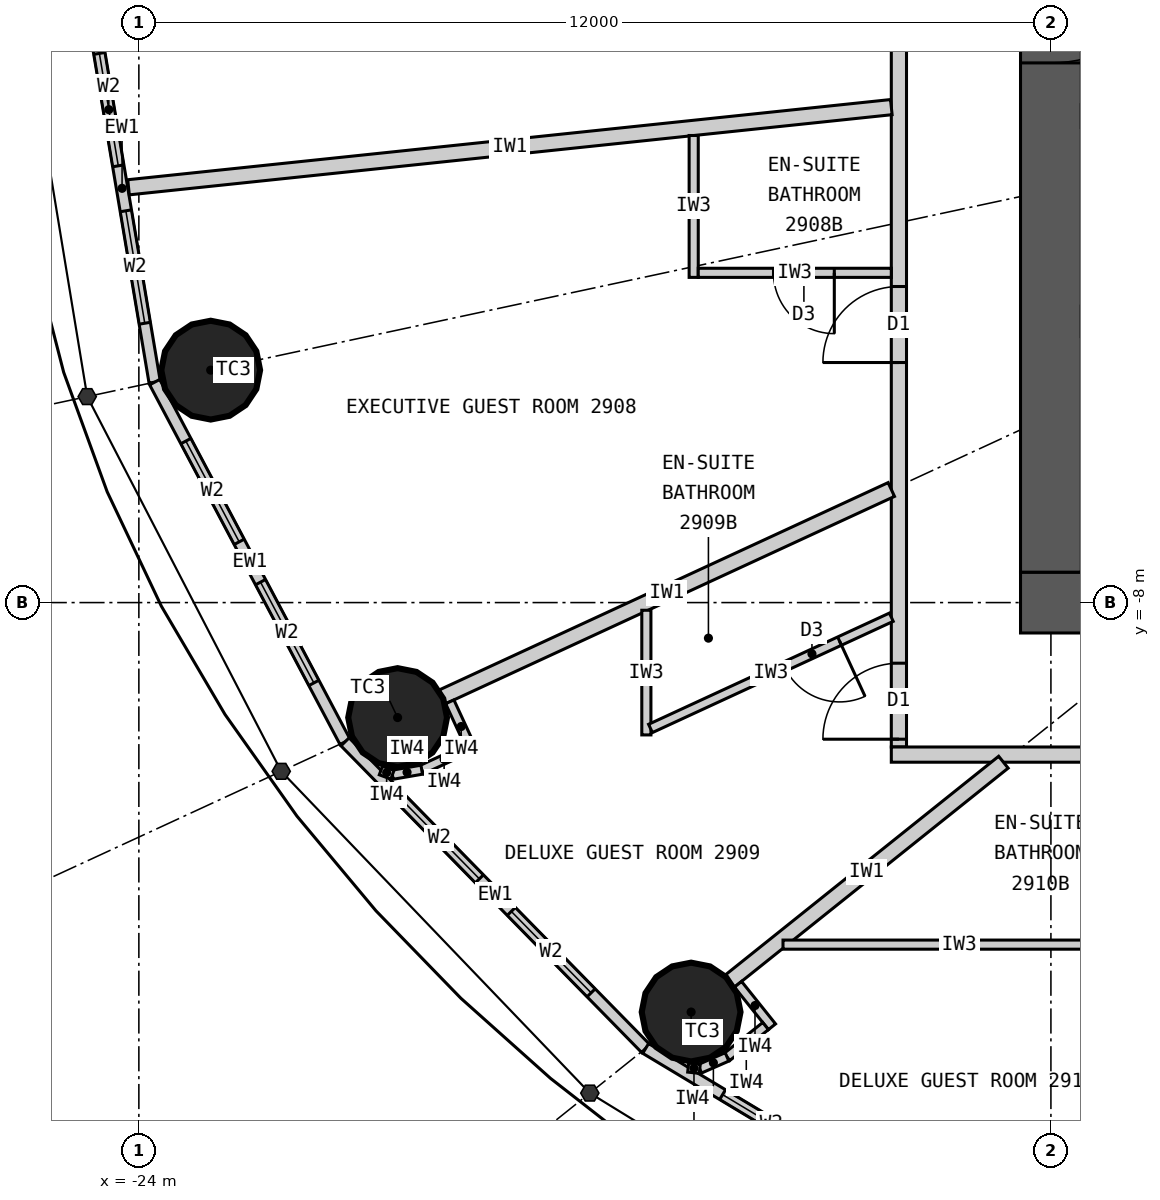
"""IFC4 building model, lengths in metres.
Left out: names, types, materials, properties, quantities, classifications, styles, units other than length and angle.
Written with IfcOpenShell. Run it as: python <this file> out.ifc"""

import sys

from ifc_helpers import new_model, si_unit, direction, frame, frame_2d, origin, origin_2d, place, context, subcontext, project, spatial, rectangle, circle, extrude, element, fill, save


model = new_model("IFC4")
c1 = context("Model", 3, precision=1e-05, world=origin(), true_north=direction((0.0, 1.0)))
c2 = subcontext(c1, "Body", "Model", "MODEL_VIEW")
j1 = project(units=[si_unit("LENGTHUNIT", "METRE"), si_unit("PLANEANGLEUNIT", "RADIAN")], contexts=[c1])
p1 = place(None, origin())
s1 = spatial("IfcSite", under=j1, at=p1, CompositionType="ELEMENT")
p2 = place(p1, origin())
s2 = spatial("IfcBuilding", under=s1, at=p2, CompositionType="ELEMENT")
p3 = place(p2, frame((0.0, 0.0, 115.5)))
s3 = spatial("IfcBuildingStorey", under=s2, at=p3, CompositionType="ELEMENT", Elevation=115.5)
for number, where, z_axis, x_axis in (
    (1, (-23.055, -4.942, 0.0), (0.0, 0.0, 1.0), (1.0, 0.0, 0.0)),
    (2, (-20.596, -9.513, 0.0), (0.0, 0.0, 1.0), (1.0, 0.0, 0.0)),
    (3, (-16.734, -13.387, 0.0), (0.0, 0.0, 1.0), (1.0, 0.0, 0.0)),
):
    element("IfcColumn", number, at=place(p3, frame(where, z_axis=z_axis, x_axis=x_axis)), inside=s3, PredefinedType="COLUMN", context=c2, shape_type="SweptSolid", body=[
        extrude(circle(Radius=0.65, at=origin_2d()), origin(), (0.0, 0.0, 1.0), 3.3),
    ])
p4 = place(p3, frame((12.4, -8.0, 0.0), z_axis=(0.0, 0.0, 1.0), x_axis=(-1.0, 0.0, 0.0)))
e4 = element("IfcWall", 4, at=p4, inside=s3, PredefinedType="SHEAR", context=c2, shape_type="SweptSolid", body=[
    extrude(rectangle(XDim=24.8, YDim=0.8, at=frame_2d((12.4, 0.0))), origin(), (0.0, 0.0, 1.0), 3.3),
])
p5 = place(p4, frame((11.1, 0.0, 0.0)))
e5 = element("IfcOpeningElement", 5, at=p5, cuts=e4, PredefinedType="OPENING", context=c2, shape_type="SweptSolid", body=[
    extrude(rectangle(XDim=1.2, YDim=2.2, at=frame_2d((0.6, 1.1))), frame((0.0, 0.41, 0.0), z_axis=(0.0, -1.0, 0.0), x_axis=(1.0, 0.0, 0.0)), (0.0, 0.0, 1.0), 0.82),
])
p6 = place(p4, frame((18.7, 0.0, 0.0)))
e6 = element("IfcOpeningElement", 6, at=p6, cuts=e4, PredefinedType="OPENING", context=c2, shape_type="SweptSolid", body=[
    extrude(rectangle(XDim=0.9, YDim=2.2, at=frame_2d((0.45, 1.1))), frame((0.0, 0.41, 0.0), z_axis=(0.0, -1.0, 0.0), x_axis=(1.0, 0.0, 0.0)), (0.0, 0.0, 1.0), 0.82),
])
p7 = place(p3, frame((-12.0, 7.6, 0.0), z_axis=(0.0, 0.0, 1.0), x_axis=(0.0, -1.0, 0.0)))
e7 = element("IfcWall", 7, at=p7, inside=s3, PredefinedType="SHEAR", context=c2, shape_type="SweptSolid", body=[
    extrude(rectangle(XDim=15.2, YDim=0.8, at=frame_2d((7.6, 0.0))), origin(), (0.0, 0.0, 1.0), 3.3),
])
p8 = place(p7, frame((6.7, 0.0, 0.0)))
e8 = element("IfcOpeningElement", 8, at=p8, cuts=e7, PredefinedType="OPENING", context=c2, shape_type="SweptSolid", body=[
    extrude(rectangle(XDim=1.8, YDim=2.2, at=frame_2d((0.9, 1.1))), frame((0.0, 0.41, 0.0), z_axis=(0.0, -1.0, 0.0), x_axis=(1.0, 0.0, 0.0)), (0.0, 0.0, 1.0), 0.82),
])
p9 = place(p3, frame((-24.65, 0.0, 0.0), z_axis=(0.0, 0.0, 1.0), x_axis=(0.165883894218, -0.986145290329, 0.0)))
e9 = element("IfcWall", 9, at=p9, inside=s3, PredefinedType="ELEMENTEDWALL", context=c2, shape_type="SweptSolid", body=[
    extrude(rectangle(XDim=5.172, YDim=0.15, at=frame_2d((2.586, 0.0))), origin(), (0.0, 0.0, 1.0), 3.12),
])
p10 = place(p9, frame((0.786, 0.0, 0.9)))
e10 = element("IfcOpeningElement", 10, at=p10, cuts=e9, PredefinedType="OPENING", context=c2, shape_type="SweptSolid", body=[
    extrude(rectangle(XDim=1.5, YDim=1.9, at=frame_2d((0.75, 0.95))), frame((0.0, 0.085, 0.0), z_axis=(0.0, -1.0, 0.0), x_axis=(1.0, 0.0, 0.0)), (0.0, 0.0, 1.0), 0.17),
])
p11 = place(p9, frame((2.886, 0.0, 0.9)))
e11 = element("IfcOpeningElement", 11, at=p11, cuts=e9, PredefinedType="OPENING", context=c2, shape_type="SweptSolid", body=[
    extrude(rectangle(XDim=1.5, YDim=1.9, at=frame_2d((0.75, 0.95))), frame((0.0, 0.085, 0.0), z_axis=(0.0, -1.0, 0.0), x_axis=(1.0, 0.0, 0.0)), (0.0, 0.0, 1.0), 0.17),
])
p12 = place(p3, frame((-23.792, -5.1, 0.0), z_axis=(0.0, 0.0, 1.0), x_axis=(0.467814388454, -0.883826735257, 0.0)))
e12 = element("IfcWall", 12, at=p12, inside=s3, PredefinedType="ELEMENTEDWALL", context=c2, shape_type="SweptSolid", body=[
    extrude(rectangle(XDim=5.354, YDim=0.15, at=frame_2d((2.677, 0.0))), origin(), (0.0, 0.0, 1.0), 3.12),
])
p13 = place(p12, frame((0.877, 0.0, 0.9)))
e13 = element("IfcOpeningElement", 13, at=p13, cuts=e12, PredefinedType="OPENING", context=c2, shape_type="SweptSolid", body=[
    extrude(rectangle(XDim=1.5, YDim=1.9, at=frame_2d((0.75, 0.95))), frame((0.0, 0.085, 0.0), z_axis=(0.0, -1.0, 0.0), x_axis=(1.0, 0.0, 0.0)), (0.0, 0.0, 1.0), 0.17),
])
p14 = place(p12, frame((2.977, 0.0, 0.9)))
e14 = element("IfcOpeningElement", 14, at=p14, cuts=e12, PredefinedType="OPENING", context=c2, shape_type="SweptSolid", body=[
    extrude(rectangle(XDim=1.5, YDim=1.9, at=frame_2d((0.75, 0.95))), frame((0.0, 0.085, 0.0), z_axis=(0.0, -1.0, 0.0), x_axis=(1.0, 0.0, 0.0)), (0.0, 0.0, 1.0), 0.17),
])
p15 = place(p3, frame((-21.287, -9.832, 0.0), z_axis=(0.0, 0.0, 1.0), x_axis=(0.700136650834, -0.714008872605, 0.0)))
e15 = element("IfcWall", 15, at=p15, inside=s3, PredefinedType="ELEMENTEDWALL", context=c2, shape_type="SweptSolid", body=[
    extrude(rectangle(XDim=5.649, YDim=0.15, at=frame_2d((2.825, 0.0))), origin(), (0.0, 0.0, 1.0), 3.12),
])
p16 = place(p15, frame((1.025, 0.0, 0.9)))
e16 = element("IfcOpeningElement", 16, at=p16, cuts=e15, PredefinedType="OPENING", context=c2, shape_type="SweptSolid", body=[
    extrude(rectangle(XDim=1.5, YDim=1.9, at=frame_2d((0.75, 0.95))), frame((0.0, 0.085, 0.0), z_axis=(0.0, -1.0, 0.0), x_axis=(1.0, 0.0, 0.0)), (0.0, 0.0, 1.0), 0.17),
])
p17 = place(p15, frame((3.125, 0.0, 0.9)))
e17 = element("IfcOpeningElement", 17, at=p17, cuts=e15, PredefinedType="OPENING", context=c2, shape_type="SweptSolid", body=[
    extrude(rectangle(XDim=1.5, YDim=1.9, at=frame_2d((0.75, 0.95))), frame((0.0, 0.085, 0.0), z_axis=(0.0, -1.0, 0.0), x_axis=(1.0, 0.0, 0.0)), (0.0, 0.0, 1.0), 0.17),
])
p18 = place(p3, frame((-17.332, -13.866, 0.0), z_axis=(0.0, 0.0, 1.0), x_axis=(0.857308573723, -0.514802884044, 0.0)))
e18 = element("IfcWall", 18, at=p18, inside=s3, PredefinedType="ELEMENTEDWALL", context=c2, shape_type="SweptSolid", body=[
    extrude(rectangle(XDim=5.961, YDim=0.15, at=frame_2d((2.98, 0.0))), origin(), (0.0, 0.0, 1.0), 3.12),
])
p19 = place(p18, frame((1.181, 0.0, 0.9)))
e19 = element("IfcOpeningElement", 19, at=p19, cuts=e18, PredefinedType="OPENING", context=c2, shape_type="SweptSolid", body=[
    extrude(rectangle(XDim=1.5, YDim=1.9, at=frame_2d((0.75, 0.95))), frame((0.0, 0.085, 0.0), z_axis=(0.0, -1.0, 0.0), x_axis=(1.0, 0.0, 0.0)), (0.0, 0.0, 1.0), 0.17),
])
p20 = place(p18, frame((3.281, 0.0, 0.9)))
e20 = element("IfcOpeningElement", 20, at=p20, cuts=e18, PredefinedType="OPENING", context=c2, shape_type="SweptSolid", body=[
    extrude(rectangle(XDim=1.5, YDim=1.9, at=frame_2d((0.75, 0.95))), frame((0.0, 0.085, 0.0), z_axis=(0.0, -1.0, 0.0), x_axis=(1.0, 0.0, 0.0)), (0.0, 0.0, 1.0), 0.17),
])
p21 = place(p3, frame((-14.0, 9.9, 0.0), z_axis=(0.0, 0.0, 1.0), x_axis=(0.0, -1.0, 0.0)))
e21 = element("IfcWall", 21, at=p21, inside=s3, PredefinedType="PARTITIONING", context=c2, shape_type="SweptSolid", body=[
    extrude(rectangle(XDim=19.8, YDim=0.2, at=frame_2d((9.9, 0.0))), origin(), (0.0, 0.0, 1.0), 3.12),
])
p22 = place(p21, frame((3.622, 0.0, 0.0)))
e22 = element("IfcOpeningElement", 22, at=p22, cuts=e21, PredefinedType="OPENING", context=c2, shape_type="SweptSolid", body=[
    extrude(rectangle(XDim=1.0, YDim=2.2, at=frame_2d((0.5, 1.1))), frame((0.0, 0.11, 0.0), z_axis=(0.0, -1.0, 0.0), x_axis=(1.0, 0.0, 0.0)), (0.0, 0.0, 1.0), 0.22),
])
p23 = place(p21, frame((9.238, 0.0, 0.0)))
e23 = element("IfcOpeningElement", 23, at=p23, cuts=e21, PredefinedType="OPENING", context=c2, shape_type="SweptSolid", body=[
    extrude(rectangle(XDim=1.0, YDim=2.2, at=frame_2d((0.5, 1.1))), frame((0.0, 0.11, 0.0), z_axis=(0.0, -1.0, 0.0), x_axis=(1.0, 0.0, 0.0)), (0.0, 0.0, 1.0), 0.22),
])
p24 = place(p21, frame((13.742, 0.0, 0.0)))
e24 = element("IfcOpeningElement", 24, at=p24, cuts=e21, PredefinedType="OPENING", context=c2, shape_type="SweptSolid", body=[
    extrude(rectangle(XDim=1.0, YDim=2.2, at=frame_2d((0.5, 1.1))), frame((0.0, 0.11, 0.0), z_axis=(0.0, -1.0, 0.0), x_axis=(1.0, 0.0, 0.0)), (0.0, 0.0, 1.0), 0.22),
])
p25 = place(p21, frame((18.698, 0.0, 0.0)))
e25 = element("IfcOpeningElement", 25, at=p25, cuts=e21, PredefinedType="OPENING", context=c2, shape_type="SweptSolid", body=[
    extrude(rectangle(XDim=1.0, YDim=2.2, at=frame_2d((0.5, 1.1))), frame((0.0, 0.11, 0.0), z_axis=(0.0, -1.0, 0.0), x_axis=(1.0, 0.0, 0.0)), (0.0, 0.0, 1.0), 0.22),
])
p26 = place(p3, frame((-3.283, -10.0, 0.0), z_axis=(0.0, 0.0, 1.0), x_axis=(-1.0, 0.0, 0.0)))
e26 = element("IfcWall", 26, at=p26, inside=s3, PredefinedType="PARTITIONING", context=c2, shape_type="SweptSolid", body=[
    extrude(rectangle(XDim=10.817, YDim=0.2, at=frame_2d((5.409, 0.0))), origin(), (0.0, 0.0, 1.0), 3.12),
])
p27 = place(p26, frame((6.482, 0.0, 0.0)))
e27 = element("IfcOpeningElement", 27, at=p27, cuts=e26, PredefinedType="OPENING", context=c2, shape_type="SweptSolid", body=[
    extrude(rectangle(XDim=1.0, YDim=2.2, at=frame_2d((0.5, 1.1))), frame((0.0, 0.11, 0.0), z_axis=(0.0, -1.0, 0.0), x_axis=(1.0, 0.0, 0.0)), (0.0, 0.0, 1.0), 0.22),
])
p28 = place(p3, frame((-14.1, -1.482, 0.0), z_axis=(0.0, 0.0, 1.0), x_axis=(-0.994523202615, -0.104516024894, 0.0)))
e28 = element("IfcWall", 28, at=p28, inside=s3, PredefinedType="PARTITIONING", context=c2, shape_type="SweptSolid", body=[
    extrude(rectangle(XDim=10.091, YDim=0.2, at=frame_2d((5.045, 0.0))), origin(), (0.0, 0.0, 1.0), 2.47),
])
p29 = place(p3, frame((-14.1, -6.512, 0.0), z_axis=(0.0, 0.0, 1.0), x_axis=(-0.907833019998, -0.419331858797, 0.0)))
e29 = element("IfcWall", 29, at=p29, inside=s3, PredefinedType="PARTITIONING", context=c2, shape_type="SweptSolid", body=[
    extrude(rectangle(XDim=6.505, YDim=0.2, at=frame_2d((3.252, 0.0))), origin(), (0.0, 0.0, 1.0), 2.27),
])
p30 = place(p3, frame((-12.625, -10.1, 0.0), z_axis=(0.0, 0.0, 1.0), x_axis=(-0.780863644897, -0.624701503182, 0.0)))
e30 = element("IfcWall", 30, at=p30, inside=s3, PredefinedType="PARTITIONING", context=c2, shape_type="SweptSolid", body=[
    extrude(rectangle(XDim=4.612, YDim=0.2, at=frame_2d((2.306, 0.0))), origin(), (0.0, 0.0, 1.0), 2.37),
])
p31 = place(p3, frame((-16.7, -1.855, 0.0), z_axis=(0.0, 0.0, 1.0), x_axis=(0.0, -1.0, 0.0)))
e31 = element("IfcWall", 31, at=p31, inside=s3, PredefinedType="PARTITIONING", context=c2, shape_type="SweptSolid", body=[
    extrude(rectangle(XDim=1.867, YDim=0.12, at=frame_2d((0.933, 0.0))), origin(), (0.0, 0.0, 1.0), 3.12),
])
p32 = place(p3, frame((-14.1, -3.662, 0.0), z_axis=(0.0, 0.0, 1.0), x_axis=(-1.0, 0.0, 0.0)))
e32 = element("IfcWall", 32, at=p32, inside=s3, PredefinedType="PARTITIONING", context=c2, shape_type="SweptSolid", body=[
    extrude(rectangle(XDim=2.54, YDim=0.12, at=frame_2d((1.27, 0.0))), origin(), (0.0, 0.0, 1.0), 2.37),
])
p33 = place(p32, frame((0.75, 0.0, 0.0)))
e33 = element("IfcOpeningElement", 33, at=p33, cuts=e32, PredefinedType="OPENING", context=c2, shape_type="SweptSolid", body=[
    extrude(rectangle(XDim=0.8, YDim=2.1, at=frame_2d((0.4, 1.05))), frame((0.0, 0.07, 0.0), z_axis=(0.0, -1.0, 0.0), x_axis=(1.0, 0.0, 0.0)), (0.0, 0.0, 1.0), 0.14),
])
p34 = place(p3, frame((-17.323, -8.101, 0.0), z_axis=(0.0, 0.0, 1.0), x_axis=(0.0, -1.0, 0.0)))
e34 = element("IfcWall", 34, at=p34, inside=s3, PredefinedType="PARTITIONING", context=c2, shape_type="SweptSolid", body=[
    extrude(rectangle(XDim=1.64, YDim=0.12, at=frame_2d((0.82, 0.0))), origin(), (0.0, 0.0, 1.0), 3.12),
])
p35 = place(p3, frame((-14.1, -8.193, 0.0), z_axis=(0.0, 0.0, 1.0), x_axis=(-0.907836493557, -0.419324338628, 0.0)))
e35 = element("IfcWall", 35, at=p35, inside=s3, PredefinedType="PARTITIONING", context=c2, shape_type="SweptSolid", body=[
    extrude(rectangle(XDim=3.49, YDim=0.12, at=frame_2d((1.745, 0.0))), origin(), (0.0, 0.0, 1.0), 3.12),
])
p36 = place(p35, frame((0.75, 0.0, 0.0)))
e36 = element("IfcOpeningElement", 36, at=p36, cuts=e35, PredefinedType="OPENING", context=c2, shape_type="SweptSolid", body=[
    extrude(rectangle(XDim=0.8, YDim=2.1, at=frame_2d((0.4, 1.05))), frame((0.0, 0.07, 0.0), z_axis=(0.0, -1.0, 0.0), x_axis=(1.0, 0.0, 0.0)), (0.0, 0.0, 1.0), 0.14),
])
p37 = place(p3, frame((-15.525, -12.5, 0.0), z_axis=(0.0, 0.0, 1.0), x_axis=(1.0, 0.0, 0.0)))
e37 = element("IfcWall", 37, at=p37, inside=s3, PredefinedType="PARTITIONING", context=c2, shape_type="SweptSolid", body=[
    extrude(rectangle(XDim=4.64, YDim=0.12, at=frame_2d((2.32, 0.0))), origin(), (0.0, 0.0, 1.0), 3.12),
])
p38 = place(p3, frame((-19.909, -9.306, 0.0), z_axis=(0.0, 0.0, 1.0), x_axis=(0.419296148934, -0.90784951368, 0.0)))
e38 = element("IfcWall", 38, at=p38, inside=s3, PredefinedType="PARTITIONING", context=c2, shape_type="SweptSolid", body=[
    extrude(rectangle(XDim=0.716, YDim=0.12, at=frame_2d((0.358, 0.0))), origin(), (0.0, 0.0, 1.0), 3.12),
])
p39 = place(p3, frame((-19.689, -9.926, 0.0), z_axis=(0.0, 0.0, 1.0), x_axis=(-0.907893409272, -0.419201094227, 0.0)))
e39 = element("IfcWall", 39, at=p39, inside=s3, PredefinedType="PARTITIONING", context=c2, shape_type="SweptSolid", body=[
    extrude(rectangle(XDim=0.65, YDim=0.12, at=frame_2d((0.325, 0.0))), origin(), (0.0, 0.0, 1.0), 3.12),
])
p40 = place(p3, frame((-20.279, -10.199, 0.0), z_axis=(0.0, 0.0, 1.0), x_axis=(-0.985380740712, -0.170366651181, 0.0)))
e40 = element("IfcWall", 40, at=p40, inside=s3, PredefinedType="PARTITIONING", context=c2, shape_type="SweptSolid", body=[
    extrude(rectangle(XDim=0.391, YDim=0.12, at=frame_2d((0.196, 0.0))), origin(), (0.0, 0.0, 1.0), 3.12),
])
p41 = place(p3, frame((-20.664, -10.265, 0.0), z_axis=(0.0, 0.0, 1.0), x_axis=(-0.938058651481, 0.346476501918, 0.0)))
e41 = element("IfcWall", 41, at=p41, inside=s3, PredefinedType="PARTITIONING", context=c2, shape_type="SweptSolid", body=[
    extrude(rectangle(XDim=0.161, YDim=0.12, at=frame_2d((0.081, 0.0))), origin(), (0.0, 0.0, 1.0), 3.12),
])
p42 = place(p3, frame((-16.117, -13.022, 0.0), z_axis=(0.0, 0.0, 1.0), x_axis=(0.62465344249, -0.780902091677, 0.0)))
e42 = element("IfcWall", 42, at=p42, inside=s3, PredefinedType="PARTITIONING", context=c2, shape_type="SweptSolid", body=[
    extrude(rectangle(XDim=0.716, YDim=0.12, at=frame_2d((0.358, 0.0))), origin(), (0.0, 0.0, 1.0), 3.12),
])
p43 = place(p3, frame((-15.754, -13.571, 0.0), z_axis=(0.0, 0.0, 1.0), x_axis=(-0.780905453553, -0.624649239663, 0.0)))
e43 = element("IfcWall", 43, at=p43, inside=s3, PredefinedType="PARTITIONING", context=c2, shape_type="SweptSolid", body=[
    extrude(rectangle(XDim=0.65, YDim=0.12, at=frame_2d((0.325, 0.0))), origin(), (0.0, 0.0, 1.0), 3.12),
])
p44 = place(p3, frame((-16.262, -13.977, 0.0), z_axis=(0.0, 0.0, 1.0), x_axis=(-0.915985403703, -0.401211590314, 0.0)))
e44 = element("IfcWall", 44, at=p44, inside=s3, PredefinedType="PARTITIONING", context=c2, shape_type="SweptSolid", body=[
    extrude(rectangle(XDim=0.391, YDim=0.12, at=frame_2d((0.196, 0.0))), origin(), (0.0, 0.0, 1.0), 3.12),
])
p45 = place(p3, frame((-16.62, -14.134, 0.0), z_axis=(0.0, 0.0, 1.0), x_axis=(-0.993941871493, 0.109907033867, 0.0)))
e45 = element("IfcWall", 45, at=p45, inside=s3, PredefinedType="PARTITIONING", context=c2, shape_type="SweptSolid", body=[
    extrude(rectangle(XDim=0.153, YDim=0.12, at=frame_2d((0.077, 0.0))), origin(), (0.0, 0.0, 1.0), 3.12),
])
p46 = place(p10, origin())
e46 = element("IfcWindow", 46, at=p46, inside=s3, PartitioningType="SINGLE_PANEL", PredefinedType="WINDOW", context=c2, shape_type="SweptSolid", body=[
    extrude(rectangle(XDim=1.5, YDim=1.9, at=frame_2d((0.75, 0.95))), frame((0.0, 0.03, 0.0), z_axis=(0.0, -1.0, 0.0), x_axis=(1.0, 0.0, 0.0)), (0.0, 0.0, 1.0), 0.06),
])
fill(e10, e46)
p47 = place(p11, origin())
e47 = element("IfcWindow", 47, at=p47, inside=s3, PartitioningType="SINGLE_PANEL", PredefinedType="WINDOW", context=c2, shape_type="SweptSolid", body=[
    extrude(rectangle(XDim=1.5, YDim=1.9, at=frame_2d((0.75, 0.95))), frame((0.0, 0.03, 0.0), z_axis=(0.0, -1.0, 0.0), x_axis=(1.0, 0.0, 0.0)), (0.0, 0.0, 1.0), 0.06),
])
fill(e11, e47)
p48 = place(p13, origin())
e48 = element("IfcWindow", 48, at=p48, inside=s3, PartitioningType="SINGLE_PANEL", PredefinedType="WINDOW", context=c2, shape_type="SweptSolid", body=[
    extrude(rectangle(XDim=1.5, YDim=1.9, at=frame_2d((0.75, 0.95))), frame((0.0, 0.03, 0.0), z_axis=(0.0, -1.0, 0.0), x_axis=(1.0, 0.0, 0.0)), (0.0, 0.0, 1.0), 0.06),
])
fill(e13, e48)
p49 = place(p14, origin())
e49 = element("IfcWindow", 49, at=p49, inside=s3, PartitioningType="SINGLE_PANEL", PredefinedType="WINDOW", context=c2, shape_type="SweptSolid", body=[
    extrude(rectangle(XDim=1.5, YDim=1.9, at=frame_2d((0.75, 0.95))), frame((0.0, 0.03, 0.0), z_axis=(0.0, -1.0, 0.0), x_axis=(1.0, 0.0, 0.0)), (0.0, 0.0, 1.0), 0.06),
])
fill(e14, e49)
p50 = place(p16, origin())
e50 = element("IfcWindow", 50, at=p50, inside=s3, PartitioningType="SINGLE_PANEL", PredefinedType="WINDOW", context=c2, shape_type="SweptSolid", body=[
    extrude(rectangle(XDim=1.5, YDim=1.9, at=frame_2d((0.75, 0.95))), frame((0.0, 0.03, 0.0), z_axis=(0.0, -1.0, 0.0), x_axis=(1.0, 0.0, 0.0)), (0.0, 0.0, 1.0), 0.06),
])
fill(e16, e50)
p51 = place(p17, origin())
e51 = element("IfcWindow", 51, at=p51, inside=s3, PartitioningType="SINGLE_PANEL", PredefinedType="WINDOW", context=c2, shape_type="SweptSolid", body=[
    extrude(rectangle(XDim=1.5, YDim=1.9, at=frame_2d((0.75, 0.95))), frame((0.0, 0.03, 0.0), z_axis=(0.0, -1.0, 0.0), x_axis=(1.0, 0.0, 0.0)), (0.0, 0.0, 1.0), 0.06),
])
fill(e17, e51)
p52 = place(p19, origin())
e52 = element("IfcWindow", 52, at=p52, inside=s3, PartitioningType="SINGLE_PANEL", PredefinedType="WINDOW", context=c2, shape_type="SweptSolid", body=[
    extrude(rectangle(XDim=1.5, YDim=1.9, at=frame_2d((0.75, 0.95))), frame((0.0, 0.03, 0.0), z_axis=(0.0, -1.0, 0.0), x_axis=(1.0, 0.0, 0.0)), (0.0, 0.0, 1.0), 0.06),
])
fill(e19, e52)
p53 = place(p33, origin())
e53 = element("IfcDoor", 53, at=p53, inside=s3, OperationType="SINGLE_SWING_LEFT", PredefinedType="DOOR", context=c2, shape_type="SweptSolid", body=[
    extrude(rectangle(XDim=0.8, YDim=2.1, at=frame_2d((0.4, 1.05))), frame((0.0, 0.025, 0.0), z_axis=(0.0, -1.0, 0.0), x_axis=(1.0, 0.0, 0.0)), (0.0, 0.0, 1.0), 0.05),
])
fill(e33, e53)
p54 = place(p24, origin())
e54 = element("IfcDoor", 54, at=p54, inside=s3, OperationType="SINGLE_SWING_RIGHT", PredefinedType="DOOR", context=c2, shape_type="SweptSolid", body=[
    extrude(rectangle(XDim=1.0, YDim=2.2, at=frame_2d((0.5, 1.1))), frame((0.0, 0.025, 0.0), z_axis=(0.0, -1.0, 0.0), x_axis=(1.0, 0.0, 0.0)), (0.0, 0.0, 1.0), 0.05),
])
fill(e24, e54)
p55 = place(p36, origin())
e55 = element("IfcDoor", 55, at=p55, inside=s3, OperationType="SINGLE_SWING_LEFT", PredefinedType="DOOR", context=c2, shape_type="SweptSolid", body=[
    extrude(rectangle(XDim=0.8, YDim=2.1, at=frame_2d((0.4, 1.05))), frame((0.0, 0.025, 0.0), z_axis=(0.0, -1.0, 0.0), x_axis=(1.0, 0.0, 0.0)), (0.0, 0.0, 1.0), 0.05),
])
fill(e36, e55)
p56 = place(p25, origin())
e56 = element("IfcDoor", 56, at=p56, inside=s3, OperationType="SINGLE_SWING_RIGHT", PredefinedType="DOOR", context=c2, shape_type="SweptSolid", body=[
    extrude(rectangle(XDim=1.0, YDim=2.2, at=frame_2d((0.5, 1.1))), frame((0.0, 0.025, 0.0), z_axis=(0.0, -1.0, 0.0), x_axis=(1.0, 0.0, 0.0)), (0.0, 0.0, 1.0), 0.05),
])
fill(e25, e56)
p57 = place(p8, origin())
e57 = element("IfcDoor", 57, at=p57, inside=s3, OperationType="DOUBLE_DOOR_DOUBLE_SWING", PredefinedType="DOOR", context=c2, shape_type="SweptSolid", body=[
    extrude(rectangle(XDim=1.8, YDim=2.2, at=frame_2d((0.9, 1.1))), frame((0.0, 0.025, 0.0), z_axis=(0.0, -1.0, 0.0), x_axis=(1.0, 0.0, 0.0)), (0.0, 0.0, 1.0), 0.05),
])
fill(e8, e57)
save(model, sys.argv[1])
